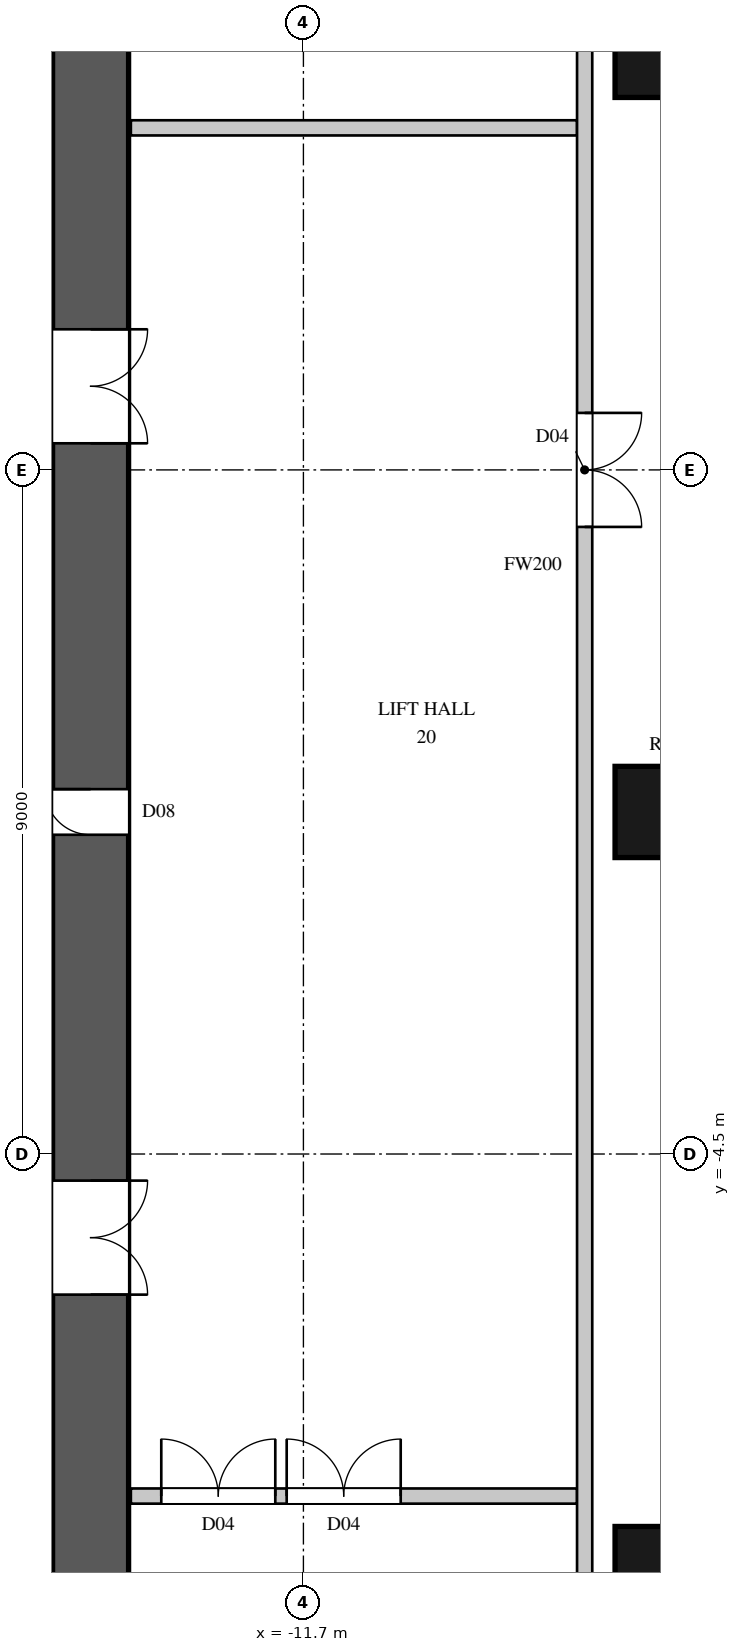
"""IFC4 building model, lengths in metres.
Left out: names, types, materials, properties, quantities, classifications, styles, units other than length and angle.
Written with IfcOpenShell. Run it as: python <this file> out.ifc"""

import sys

from ifc_helpers import new_model, si_unit, direction, frame, frame_2d, origin, origin_2d, place, context, subcontext, project, spatial, rectangle, circle, extrude, element, fill, save


model = new_model("IFC4")
c1 = context("Model", 3, precision=1e-05, world=origin(), true_north=direction((0.0, 1.0)))
c2 = subcontext(c1, "Body", "Model", "MODEL_VIEW")
j1 = project(units=[si_unit("LENGTHUNIT", "METRE"), si_unit("PLANEANGLEUNIT", "RADIAN")], contexts=[c1])
p1 = place(None, origin())
s1 = spatial("IfcSite", under=j1, at=p1, CompositionType="ELEMENT")
p2 = place(p1, origin())
s2 = spatial("IfcBuilding", under=s1, at=p2, CompositionType="ELEMENT")
p3 = place(p2, frame((0.0, 0.0, 102.3)))
s3 = spatial("IfcBuildingStorey", under=s2, at=p3, CompositionType="ELEMENT", Elevation=102.3)
for number, where, z_axis, x_axis in (
    (1, (-7.0, -10.0, 0.0), (0.0, 0.0, 1.0), (1.0, 0.0, 0.0)),
    (2, (-7.0, 0.0, 0.0), (0.0, 0.0, 1.0), (1.0, 0.0, 0.0)),
    (3, (-7.0, 10.0, 0.0), (0.0, 0.0, 1.0), (1.0, 0.0, 0.0)),
):
    element("IfcColumn", number, at=place(p3, frame(where, z_axis=z_axis, x_axis=x_axis)), inside=s3, PredefinedType="COLUMN", context=c2, shape_type="SweptSolid", body=[
        extrude(circle(Radius=0.6, at=origin_2d()), origin(), (0.0, 0.0, 1.0), 3.6),
    ])
p4 = place(p3, frame((-14.5, -14.8, 0.0), z_axis=(0.0, 0.0, 1.0), x_axis=(0.0, 1.0, 0.0)))
e4 = element("IfcWall", 4, at=p4, inside=s3, PredefinedType="SHEAR", context=c2, shape_type="SweptSolid", body=[
    extrude(rectangle(XDim=29.6, YDim=1.0, at=frame_2d((14.8, 0.0))), origin(), (0.0, 0.0, 1.0), 3.6),
])
p5 = place(p4, frame((8.45, 0.0, 0.0)))
e5 = element("IfcOpeningElement", 5, at=p5, cuts=e4, PredefinedType="OPENING", context=c2, shape_type="SweptSolid", body=[
    extrude(rectangle(XDim=1.5, YDim=2.4, at=frame_2d((0.75, 1.2))), frame((0.0, 0.51, 0.0), z_axis=(0.0, -1.0, 0.0), x_axis=(1.0, 0.0, 0.0)), (0.0, 0.0, 1.0), 1.02),
])
p6 = place(p4, frame((19.65, 0.0, 0.0)))
e6 = element("IfcOpeningElement", 6, at=p6, cuts=e4, PredefinedType="OPENING", context=c2, shape_type="SweptSolid", body=[
    extrude(rectangle(XDim=1.5, YDim=2.4, at=frame_2d((0.75, 1.2))), frame((0.0, 0.51, 0.0), z_axis=(0.0, -1.0, 0.0), x_axis=(1.0, 0.0, 0.0)), (0.0, 0.0, 1.0), 1.02),
])
p7 = place(p4, frame((14.5, 0.0, 0.0)))
e7 = element("IfcOpeningElement", 7, at=p7, cuts=e4, PredefinedType="OPENING", context=c2, shape_type="SweptSolid", body=[
    extrude(rectangle(XDim=0.6, YDim=2.0, at=frame_2d((0.3, 1.0))), frame((0.0, 0.51, 0.0), z_axis=(0.0, -1.0, 0.0), x_axis=(1.0, 0.0, 0.0)), (0.0, 0.0, 1.0), 1.02),
])
p8 = place(p3, frame((-13.97, -9.0, 0.0), z_axis=(0.0, 0.0, 1.0), x_axis=(1.0, 0.0, 0.0)))
e8 = element("IfcWall", 8, at=p8, inside=s3, PredefinedType="PARTITIONING", context=c2, shape_type="SweptSolid", body=[
    extrude(rectangle(XDim=5.87, YDim=0.2, at=frame_2d((2.935, 0.0))), origin(), (0.0, 0.0, 1.0), 3.3),
])
p9 = place(p8, frame((0.4, 0.0, 0.0)))
e9 = element("IfcOpeningElement", 9, at=p9, cuts=e8, PredefinedType="OPENING", context=c2, shape_type="SweptSolid", body=[
    extrude(rectangle(XDim=1.5, YDim=2.2, at=frame_2d((0.75, 1.1))), frame((0.0, 0.11, 0.0), z_axis=(0.0, -1.0, 0.0), x_axis=(1.0, 0.0, 0.0)), (0.0, 0.0, 1.0), 0.22),
])
p10 = place(p8, frame((2.05, 0.0, 0.0)))
e10 = element("IfcOpeningElement", 10, at=p10, cuts=e8, PredefinedType="OPENING", context=c2, shape_type="SweptSolid", body=[
    extrude(rectangle(XDim=1.5, YDim=2.2, at=frame_2d((0.75, 1.1))), frame((0.0, 0.11, 0.0), z_axis=(0.0, -1.0, 0.0), x_axis=(1.0, 0.0, 0.0)), (0.0, 0.0, 1.0), 0.22),
])
p11 = place(p3, frame((-13.97, 9.0, 0.0), z_axis=(0.0, 0.0, 1.0), x_axis=(1.0, 0.0, 0.0)))
e11 = element("IfcWall", 11, at=p11, inside=s3, PredefinedType="PARTITIONING", context=c2, shape_type="SweptSolid", body=[
    extrude(rectangle(XDim=5.87, YDim=0.2, at=frame_2d((2.935, 0.0))), origin(), (0.0, 0.0, 1.0), 3.3),
])
p12 = place(p3, frame((-8.0, -10.9, 0.0), z_axis=(0.0, 0.0, 1.0), x_axis=(0.0, 1.0, 0.0)))
e12 = element("IfcWall", 12, at=p12, inside=s3, PredefinedType="PARTITIONING", context=c2, shape_type="SweptSolid", body=[
    extrude(rectangle(XDim=28.3, YDim=0.2, at=frame_2d((14.15, 0.0))), origin(), (0.0, 0.0, 1.0), 3.3),
])
p13 = place(p12, frame((14.65, 0.0, 0.0)))
e13 = element("IfcOpeningElement", 13, at=p13, cuts=e12, PredefinedType="OPENING", context=c2, shape_type="SweptSolid", body=[
    extrude(rectangle(XDim=1.5, YDim=2.2, at=frame_2d((0.75, 1.1))), frame((0.0, 0.11, 0.0), z_axis=(0.0, -1.0, 0.0), x_axis=(1.0, 0.0, 0.0)), (0.0, 0.0, 1.0), 0.22),
])
p14 = place(p12, frame((26.55, 0.0, 0.0)))
e14 = element("IfcOpeningElement", 14, at=p14, cuts=e12, PredefinedType="OPENING", context=c2, shape_type="SweptSolid", body=[
    extrude(rectangle(XDim=1.6, YDim=2.4, at=frame_2d((0.8, 1.2))), frame((0.0, 0.11, 0.0), z_axis=(0.0, -1.0, 0.0), x_axis=(1.0, 0.0, 0.0)), (0.0, 0.0, 1.0), 0.22),
])
p15 = place(p13, origin())
e15 = element("IfcDoor", 15, at=p15, inside=s3, OperationType="DOUBLE_DOOR_SINGLE_SWING", PredefinedType="DOOR", context=c2, shape_type="SweptSolid", body=[
    extrude(rectangle(XDim=1.5, YDim=2.2, at=frame_2d((0.75, 1.1))), frame((0.0, 0.025, 0.0), z_axis=(0.0, -1.0, 0.0), x_axis=(1.0, 0.0, 0.0)), (0.0, 0.0, 1.0), 0.05),
])
fill(e13, e15)
p16 = place(p9, origin())
e16 = element("IfcDoor", 16, at=p16, inside=s3, OperationType="DOUBLE_DOOR_SINGLE_SWING", PredefinedType="DOOR", context=c2, shape_type="SweptSolid", body=[
    extrude(rectangle(XDim=1.5, YDim=2.2, at=frame_2d((0.75, 1.1))), frame((0.0, 0.025, 0.0), z_axis=(0.0, -1.0, 0.0), x_axis=(1.0, 0.0, 0.0)), (0.0, 0.0, 1.0), 0.05),
])
fill(e9, e16)
p17 = place(p10, origin())
e17 = element("IfcDoor", 17, at=p17, inside=s3, OperationType="DOUBLE_DOOR_SINGLE_SWING", PredefinedType="DOOR", context=c2, shape_type="SweptSolid", body=[
    extrude(rectangle(XDim=1.5, YDim=2.2, at=frame_2d((0.75, 1.1))), frame((0.0, 0.025, 0.0), z_axis=(0.0, -1.0, 0.0), x_axis=(1.0, 0.0, 0.0)), (0.0, 0.0, 1.0), 0.05),
])
fill(e10, e17)
p18 = place(p5, origin())
e18 = element("IfcDoor", 18, at=p18, inside=s3, OperationType="DOUBLE_DOOR_SINGLE_SWING", PredefinedType="DOOR", context=c2, shape_type="SweptSolid", body=[
    extrude(rectangle(XDim=1.5, YDim=2.4, at=frame_2d((0.75, 1.2))), frame((0.0, -0.445, 0.0), z_axis=(0.0, -1.0, 0.0), x_axis=(1.0, 0.0, 0.0)), (0.0, 0.0, 1.0), 0.05),
])
fill(e5, e18)
p19 = place(p6, origin())
e19 = element("IfcDoor", 19, at=p19, inside=s3, OperationType="DOUBLE_DOOR_SINGLE_SWING", PredefinedType="DOOR", context=c2, shape_type="SweptSolid", body=[
    extrude(rectangle(XDim=1.5, YDim=2.4, at=frame_2d((0.75, 1.2))), frame((0.0, -0.445, 0.0), z_axis=(0.0, -1.0, 0.0), x_axis=(1.0, 0.0, 0.0)), (0.0, 0.0, 1.0), 0.05),
])
fill(e6, e19)
p20 = place(p7, origin())
e20 = element("IfcDoor", 20, at=p20, inside=s3, OperationType="SINGLE_SWING_RIGHT", PredefinedType="DOOR", context=c2, shape_type="SweptSolid", body=[
    extrude(rectangle(XDim=0.6, YDim=2.0, at=frame_2d((0.3, 1.0))), frame((0.0, 0.495, 0.0), z_axis=(0.0, -1.0, 0.0), x_axis=(1.0, 0.0, 0.0)), (0.0, 0.0, 1.0), 0.05),
])
fill(e7, e20)
save(model, sys.argv[1])
